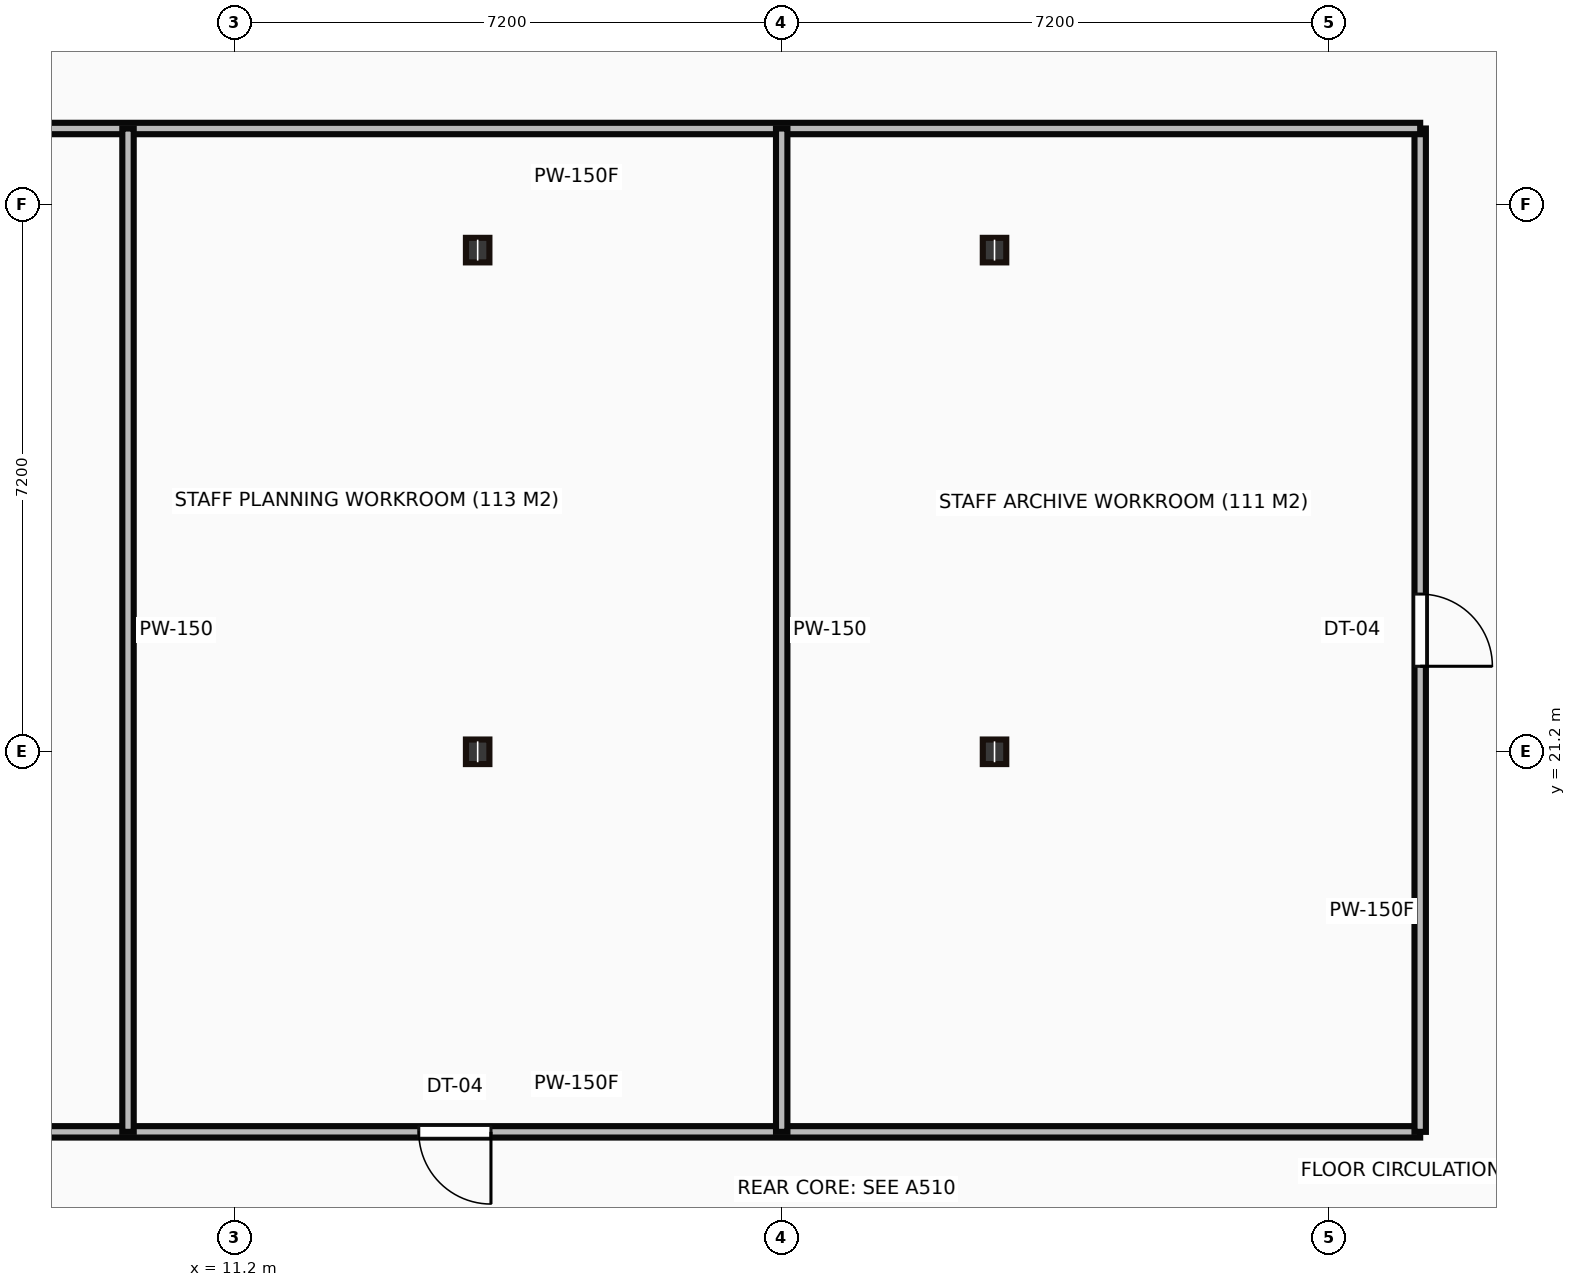
"""IFC4 building model, lengths in metres.
Left out: names, types, materials, properties, quantities, classifications, styles, units other than length and angle.
Written with IfcOpenShell. Run it as: python <this file> out.ifc"""

import sys

from ifc_helpers import new_model, si_unit, direction, frame, frame_2d, origin, origin_2d, place, context, subcontext, project, spatial, rectangle, i_section, extrude, source, transform, mapped, element, fill, save


model = new_model("IFC4")
c1 = context("Model", 3, precision=1e-05, world=origin(), true_north=direction((0.0, 1.0)))
c2 = subcontext(c1, "Body", "Model", "MODEL_VIEW")
j1 = project(units=[si_unit("LENGTHUNIT", "METRE"), si_unit("PLANEANGLEUNIT", "RADIAN")], contexts=[c1])
p1 = place(None, origin())
s1 = spatial("IfcSite", under=j1, at=p1, CompositionType="ELEMENT")
p2 = place(p1, origin())
s2 = spatial("IfcBuilding", under=s1, at=p2, CompositionType="ELEMENT")
p3 = place(p2, frame((0.0, 0.0, 225.1)))
s3 = spatial("IfcBuildingStorey", under=s2, at=p3, CompositionType="ELEMENT", Elevation=225.1)
m1 = source(origin(), c2, "Body", "SweptSolid", [
    extrude(i_section(OverallWidth=0.309, OverallDepth=0.323, WebThickness=0.014, FlangeThickness=0.023, at=origin_2d()), origin(), (0.0, 0.0, 1.0), 3.65),
])
for number, where, z_axis, x_axis in (
    (1, (14.4, 21.2, 0.0), (0.0, 0.0, 1.0), (1.0, 0.0, 0.0)),
    (2, (14.4, 27.8, 0.0), (0.0, 0.0, 1.0), (1.0, 0.0, 0.0)),
    (3, (21.2, 21.2, 0.0), (0.0, 0.0, 1.0), (1.0, 0.0, 0.0)),
    (4, (21.2, 27.8, 0.0), (0.0, 0.0, 1.0), (1.0, 0.0, 0.0)),
):
    element("IfcColumn", number, at=place(p3, frame(where, z_axis=z_axis, x_axis=x_axis)), inside=s3, PredefinedType="COLUMN", context=c2, shape_type="MappedRepresentation", body=[
        mapped(m1, transform((0.0, 0.0, 0.0))),
    ])
m2 = source(origin(), c2, "Body", "SweptSolid", [
    extrude(rectangle(XDim=22.2, YDim=0.15, at=frame_2d((11.1, 0.0))), origin(), (0.0, 0.0, 1.0), 3.4),
])
p4 = place(p3, frame((4.6, 16.2, 0.0), z_axis=(0.0, 0.0, 1.0), x_axis=(1.0, 0.0, 0.0)))
e5 = element("IfcWall", 5, at=p4, inside=s3, PredefinedType="PARTITIONING", context=c2, shape_type="MappedRepresentation", body=[
    mapped(m2, transform((0.0, 0.0, 0.0))),
])
p5 = place(p4, frame((2.255, 0.0, 0.0)))
e6 = element("IfcOpeningElement", 6, at=p5, cuts=e5, PredefinedType="OPENING", context=c2, shape_type="SweptSolid", body=[
    extrude(rectangle(XDim=0.95, YDim=2.15, at=frame_2d((0.475, 1.075))), frame((0.0, 0.085, 0.0), z_axis=(0.0, -1.0, 0.0), x_axis=(1.0, 0.0, 0.0)), (0.0, 0.0, 1.0), 0.17),
])
p6 = place(p4, frame((9.025, 0.0, 0.0)))
e7 = element("IfcOpeningElement", 7, at=p6, cuts=e5, PredefinedType="OPENING", context=c2, shape_type="SweptSolid", body=[
    extrude(rectangle(XDim=0.95, YDim=2.15, at=frame_2d((0.475, 1.075))), frame((0.0, 0.085, 0.0), z_axis=(0.0, -1.0, 0.0), x_axis=(1.0, 0.0, 0.0)), (0.0, 0.0, 1.0), 0.17),
])
m3 = source(origin(), c2, "Body", "SweptSolid", [
    extrude(rectangle(XDim=13.2, YDim=0.15, at=frame_2d((6.6, 0.0))), origin(), (0.0, 0.0, 1.0), 3.4),
])
p7 = place(p3, frame((26.8, 16.2, 0.0), z_axis=(0.0, 0.0, 1.0), x_axis=(0.0, 1.0, 0.0)))
e8 = element("IfcWall", 8, at=p7, inside=s3, PredefinedType="PARTITIONING", context=c2, shape_type="MappedRepresentation", body=[
    mapped(m3, transform((0.0, 0.0, 0.0))),
])
p8 = place(p7, frame((6.125, 0.0, 0.0)))
e9 = element("IfcOpeningElement", 9, at=p8, cuts=e8, PredefinedType="OPENING", context=c2, shape_type="SweptSolid", body=[
    extrude(rectangle(XDim=0.95, YDim=2.15, at=frame_2d((0.475, 1.075))), frame((0.0, 0.085, 0.0), z_axis=(0.0, -1.0, 0.0), x_axis=(1.0, 0.0, 0.0)), (0.0, 0.0, 1.0), 0.17),
])
p9 = place(p3, frame((26.8, 29.4, 0.0), z_axis=(0.0, 0.0, 1.0), x_axis=(-1.0, 0.0, 0.0)))
e10 = element("IfcWall", 10, at=p9, inside=s3, PredefinedType="PARTITIONING", context=c2, shape_type="MappedRepresentation", body=[
    mapped(m2, transform((0.0, 0.0, 0.0))),
])
for number, where, z_axis, x_axis in (
    (11, (9.8, 29.4, 0.0), (0.0, 0.0, 1.0), (0.0, -1.0, 0.0)),
    (12, (18.4, 29.4, 0.0), (0.0, 0.0, 1.0), (0.0, -1.0, 0.0)),
):
    element("IfcWall", number, at=place(p3, frame(where, z_axis=z_axis, x_axis=x_axis)), inside=s3, PredefinedType="PARTITIONING", context=c2, shape_type="MappedRepresentation", body=[
        mapped(m3, transform((0.0, 0.0, 0.0))),
    ])
m4 = source(origin(), c2, "Body", "SweptSolid", [
    extrude(rectangle(XDim=0.95, YDim=2.15, at=frame_2d((0.475, 1.075))), frame((0.0, 0.025, 0.0), z_axis=(0.0, -1.0, 0.0), x_axis=(1.0, 0.0, 0.0)), (0.0, 0.0, 1.0), 0.05),
])
p10 = place(p6, origin())
e13 = element("IfcDoor", 13, at=p10, inside=s3, OperationType="SINGLE_SWING_RIGHT", PredefinedType="DOOR", context=c2, shape_type="MappedRepresentation", body=[
    mapped(m4, transform((0.0, 0.0, 0.0))),
])
fill(e7, e13)
p11 = place(p8, origin())
e14 = element("IfcDoor", 14, at=p11, inside=s3, OperationType="SINGLE_SWING_LEFT", PredefinedType="DOOR", context=c2, shape_type="MappedRepresentation", body=[
    mapped(m4, transform((0.0, 0.0, 0.0))),
])
fill(e9, e14)
save(model, sys.argv[1])
